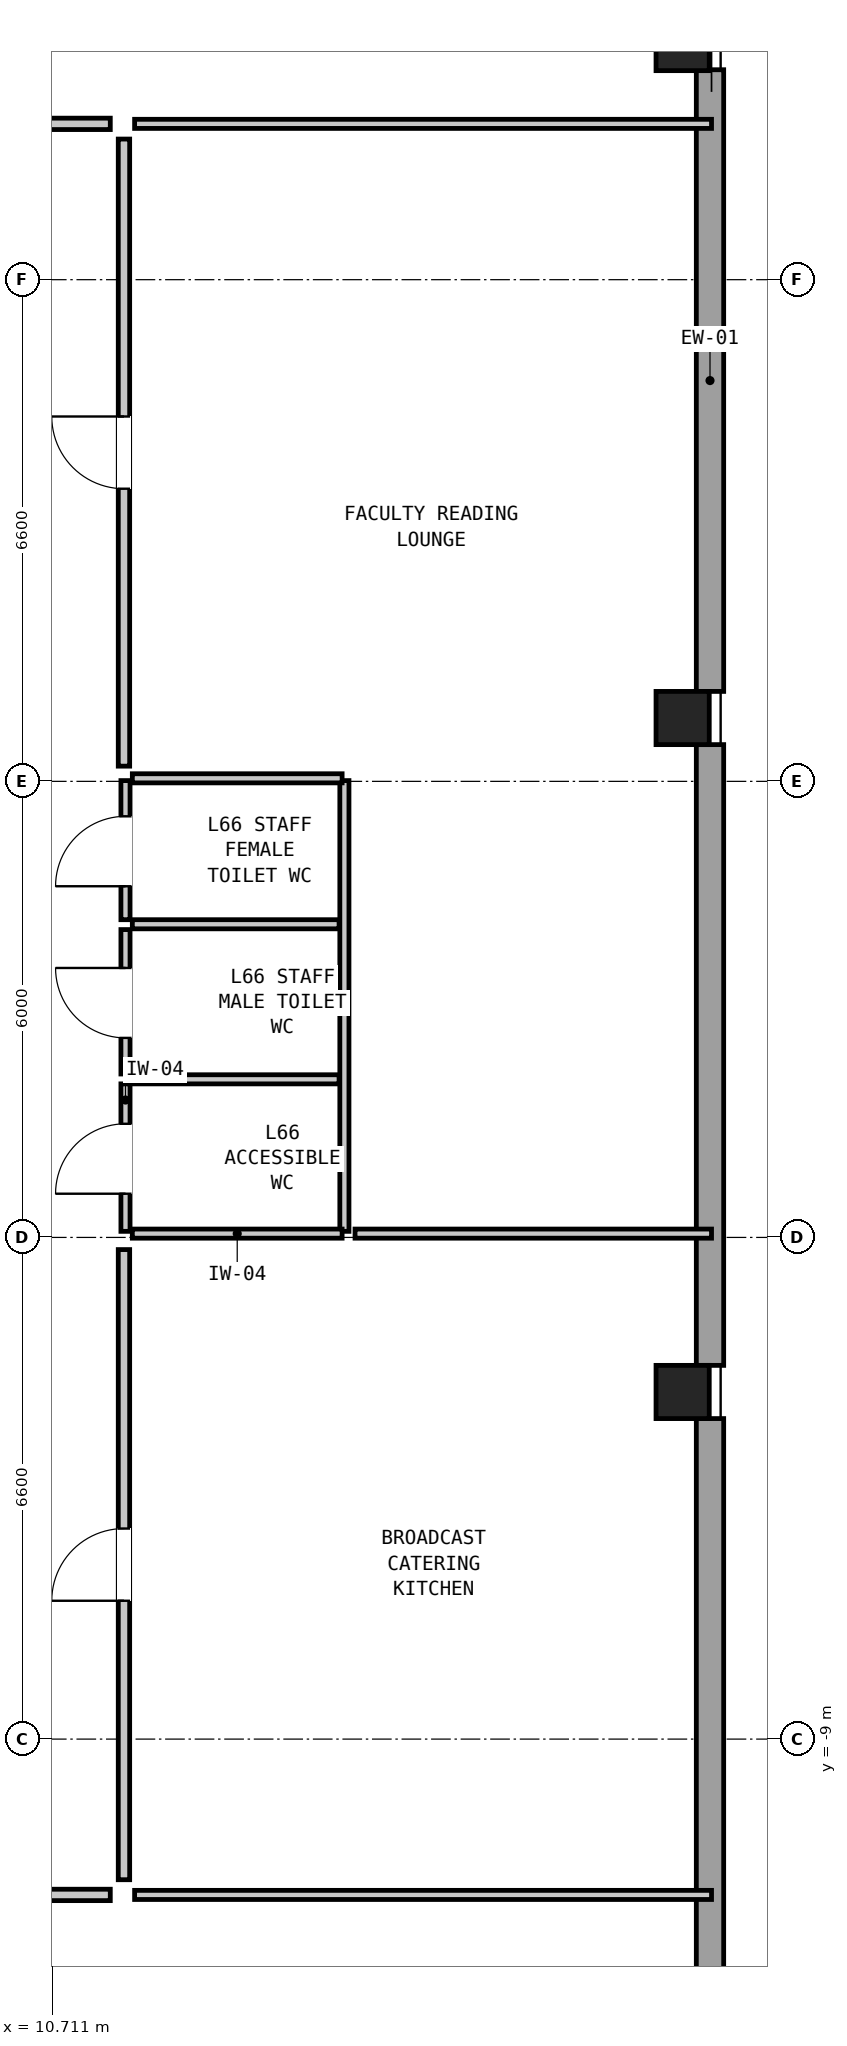
"""IFC4 building model, lengths in metres.
Left out: names, types, materials, properties, quantities, classifications, styles, units other than length and angle.
Written with IfcOpenShell. Run it as: python <this file> out.ifc"""

import sys

from ifc_helpers import new_model, si_unit, direction, frame, frame_2d, origin, origin_2d, place, context, subcontext, project, spatial, rectangle, hollow_rectangle, extrude, element, fill, save


model = new_model("IFC4")
c1 = context("Model", 3, precision=1e-05, world=origin(), true_north=direction((0.0, 1.0)))
c2 = subcontext(c1, "Body", "Model", "MODEL_VIEW")
j1 = project(units=[si_unit("LENGTHUNIT", "METRE"), si_unit("PLANEANGLEUNIT", "RADIAN")], contexts=[c1])
p1 = place(None, origin())
s1 = spatial("IfcSite", under=j1, at=p1, CompositionType="ELEMENT")
p2 = place(p1, origin())
s2 = spatial("IfcBuilding", under=s1, at=p2, CompositionType="ELEMENT")
p3 = place(p2, frame((0.0, 0.0, 223.9)))
s3 = spatial("IfcBuildingStorey", under=s2, at=p3, CompositionType="ELEMENT", Elevation=223.9)
for number, where, z_axis, x_axis in (
    (1, (19.0, -4.433, 0.0), (0.0, 0.0, 1.0), (0.0, 1.0, 0.0)),
    (2, (19.0, 4.433, 0.0), (0.0, 0.0, 1.0), (0.0, 1.0, 0.0)),
    (3, (19.0, 13.3, 0.0), (0.0, 0.0, 1.0), (0.0, 1.0, 0.0)),
):
    element("IfcColumn", number, at=place(p3, frame(where, z_axis=z_axis, x_axis=x_axis)), inside=s3, PredefinedType="COLUMN", context=c2, shape_type="SweptSolid", body=[
        extrude(hollow_rectangle(XDim=0.7, YDim=0.7, WallThickness=0.045, at=origin_2d()), origin(), (0.0, 0.0, 1.0), 3.05),
    ])
p4 = place(p3, frame((19.36, 12.962, 0.0), z_axis=(0.0, 0.0, 1.0), x_axis=(0.0, -1.0, 0.0)))
e4 = element("IfcWall", 4, at=p4, inside=s3, PredefinedType="SOLIDWALL", context=c2, shape_type="SweptSolid", body=[
    extrude(rectangle(XDim=8.179, YDim=0.36, at=frame_2d((4.089, 0.0))), origin(), (0.0, 0.0, 1.0), 0.98),
])
p5 = place(p3, frame((19.36, 4.083, 0.0), z_axis=(0.0, 0.0, 1.0), x_axis=(0.0, -1.0, 0.0)))
e5 = element("IfcWall", 5, at=p5, inside=s3, PredefinedType="SOLIDWALL", context=c2, shape_type="SweptSolid", body=[
    extrude(rectangle(XDim=8.167, YDim=0.36, at=frame_2d((4.083, 0.0))), origin(), (0.0, 0.0, 1.0), 0.98),
])
p6 = place(p3, frame((19.36, -4.783, 0.0), z_axis=(0.0, 0.0, 1.0), x_axis=(0.0, -1.0, 0.0)))
e6 = element("IfcWall", 6, at=p6, inside=s3, PredefinedType="SOLIDWALL", context=c2, shape_type="SweptSolid", body=[
    extrude(rectangle(XDim=8.179, YDim=0.36, at=frame_2d((4.089, 0.0))), origin(), (0.0, 0.0, 1.0), 0.98),
])
p7 = place(p3, frame((11.67, -2.32, 0.0), z_axis=(0.0, 0.0, 1.0), x_axis=(0.0, 1.0, 0.0)))
e7 = element("IfcWall", 7, at=p7, inside=s3, PredefinedType="PARTITIONING", context=c2, shape_type="SweptSolid", body=[
    extrude(rectangle(XDim=1.94, YDim=0.12, at=frame_2d((0.97, 0.0))), origin(), (0.0, 0.0, 1.0), 2.86),
])
p8 = place(p7, frame((0.495, 0.0, 0.0)))
e8 = element("IfcOpeningElement", 8, at=p8, cuts=e7, PredefinedType="OPENING", context=c2, shape_type="SweptSolid", body=[
    extrude(rectangle(XDim=0.92, YDim=2.1, at=frame_2d((0.46, 1.05))), frame((0.0, 0.072, 0.0), z_axis=(0.0, -1.0, 0.0), x_axis=(1.0, 0.0, 0.0)), (0.0, 0.0, 1.0), 0.144),
])
p9 = place(p3, frame((11.67, -0.25, 0.0), z_axis=(0.0, 0.0, 1.0), x_axis=(0.0, 1.0, 0.0)))
e9 = element("IfcWall", 9, at=p9, inside=s3, PredefinedType="PARTITIONING", context=c2, shape_type="SweptSolid", body=[
    extrude(rectangle(XDim=1.9, YDim=0.12, at=frame_2d((0.95, 0.0))), origin(), (0.0, 0.0, 1.0), 2.86),
])
p10 = place(p9, frame((0.475, 0.0, 0.0)))
e10 = element("IfcOpeningElement", 10, at=p10, cuts=e9, PredefinedType="OPENING", context=c2, shape_type="SweptSolid", body=[
    extrude(rectangle(XDim=0.92, YDim=2.1, at=frame_2d((0.46, 1.05))), frame((0.0, 0.072, 0.0), z_axis=(0.0, -1.0, 0.0), x_axis=(1.0, 0.0, 0.0)), (0.0, 0.0, 1.0), 0.144),
])
p11 = place(p3, frame((11.67, 1.78, 0.0), z_axis=(0.0, 0.0, 1.0), x_axis=(0.0, 1.0, 0.0)))
e11 = element("IfcWall", 11, at=p11, inside=s3, PredefinedType="PARTITIONING", context=c2, shape_type="SweptSolid", body=[
    extrude(rectangle(XDim=1.83, YDim=0.12, at=frame_2d((0.915, 0.0))), origin(), (0.0, 0.0, 1.0), 2.86),
])
p12 = place(p11, frame((0.44, 0.0, 0.0)))
e12 = element("IfcOpeningElement", 12, at=p12, cuts=e11, PredefinedType="OPENING", context=c2, shape_type="SweptSolid", body=[
    extrude(rectangle(XDim=0.92, YDim=2.1, at=frame_2d((0.46, 1.05))), frame((0.0, 0.072, 0.0), z_axis=(0.0, -1.0, 0.0), x_axis=(1.0, 0.0, 0.0)), (0.0, 0.0, 1.0), 0.144),
])
p13 = place(p3, frame((14.55, -2.32, 0.0), z_axis=(0.0, 0.0, 1.0), x_axis=(0.0, 1.0, 0.0)))
e13 = element("IfcWall", 13, at=p13, inside=s3, PredefinedType="PARTITIONING", context=c2, shape_type="SweptSolid", body=[
    extrude(rectangle(XDim=5.93, YDim=0.12, at=frame_2d((2.965, 0.0))), origin(), (0.0, 0.0, 1.0), 2.86),
])
for number, where, z_axis, x_axis in (
    (14, (11.76, -2.35, 0.0), (0.0, 0.0, 1.0), (1.0, 0.0, 0.0)),
    (15, (11.76, 3.64, 0.0), (0.0, 0.0, 1.0), (1.0, 0.0, 0.0)),
):
    element("IfcWall", number, at=place(p3, frame(where, z_axis=z_axis, x_axis=x_axis)), inside=s3, PredefinedType="PARTITIONING", context=c2, shape_type="SweptSolid", body=[
        extrude(rectangle(XDim=2.76, YDim=0.12, at=frame_2d((1.38, 0.0))), origin(), (0.0, 0.0, 1.0), 1.04),
    ])
for number, where, z_axis, x_axis in (
    (16, (11.76, -0.32, 0.0), (0.0, 0.0, 1.0), (1.0, 0.0, 0.0)),
    (17, (11.76, 1.72, 0.0), (0.0, 0.0, 1.0), (1.0, 0.0, 0.0)),
):
    element("IfcWall", number, at=place(p3, frame(where, z_axis=z_axis, x_axis=x_axis)), inside=s3, PredefinedType="PARTITIONING", context=c2, shape_type="SweptSolid", body=[
        extrude(rectangle(XDim=2.72, YDim=0.12, at=frame_2d((1.36, 0.0))), origin(), (0.0, 0.0, 1.0), 2.86),
    ])
for number, where, z_axis, x_axis in (
    (18, (11.79, 12.25, 0.0), (0.0, 0.0, 1.0), (1.0, 0.0, 0.0)),
    (19, (11.79, -11.05, 0.0), (0.0, 0.0, 1.0), (1.0, 0.0, 0.0)),
):
    element("IfcWall", number, at=place(p3, frame(where, z_axis=z_axis, x_axis=x_axis)), inside=s3, PredefinedType="PARTITIONING", context=c2, shape_type="SweptSolid", body=[
        extrude(rectangle(XDim=7.59, YDim=0.12, at=frame_2d((3.795, 0.0))), origin(), (0.0, 0.0, 1.0), 2.86),
    ])
p14 = place(p3, frame((14.69, -2.35, 0.0), z_axis=(0.0, 0.0, 1.0), x_axis=(1.0, 0.0, 0.0)))
e20 = element("IfcWall", 20, at=p14, inside=s3, PredefinedType="PARTITIONING", context=c2, shape_type="SweptSolid", body=[
    extrude(rectangle(XDim=4.69, YDim=0.12, at=frame_2d((2.345, 0.0))), origin(), (0.0, 0.0, 1.0), 1.04),
])
p15 = place(p3, frame((5.58, 12.25, 0.0), z_axis=(0.0, 0.0, 1.0), x_axis=(1.0, 0.0, 0.0)))
e21 = element("IfcWall", 21, at=p15, inside=s3, PredefinedType="PARTITIONING", context=c2, shape_type="SweptSolid", body=[
    extrude(rectangle(XDim=5.89, YDim=0.15, at=frame_2d((2.945, 0.0))), origin(), (0.0, 0.0, 1.0), 2.86),
])
p16 = place(p15, frame((2.145, 0.0, 0.0)))
e22 = element("IfcOpeningElement", 22, at=p16, cuts=e21, PredefinedType="OPENING", context=c2, shape_type="SweptSolid", body=[
    extrude(rectangle(XDim=1.2, YDim=2.1, at=frame_2d((0.6, 1.05))), frame((0.0, 0.087, 0.0), z_axis=(0.0, -1.0, 0.0), x_axis=(1.0, 0.0, 0.0)), (0.0, 0.0, 1.0), 0.174),
])
p17 = place(p3, frame((0.18, -11.05, 0.0), z_axis=(0.0, 0.0, 1.0), x_axis=(1.0, 0.0, 0.0)))
e23 = element("IfcWall", 23, at=p17, inside=s3, PredefinedType="PARTITIONING", context=c2, shape_type="SweptSolid", body=[
    extrude(rectangle(XDim=11.29, YDim=0.15, at=frame_2d((5.645, 0.0))), origin(), (0.0, 0.0, 1.0), 2.86),
])
p18 = place(p17, frame((5.045, 0.0, 0.0)))
e24 = element("IfcOpeningElement", 24, at=p18, cuts=e23, PredefinedType="OPENING", context=c2, shape_type="SweptSolid", body=[
    extrude(rectangle(XDim=1.2, YDim=2.1, at=frame_2d((0.6, 1.05))), frame((0.0, 0.087, 0.0), z_axis=(0.0, -1.0, 0.0), x_axis=(1.0, 0.0, 0.0)), (0.0, 0.0, 1.0), 0.174),
])
p19 = place(p3, frame((11.65, -10.85, 0.0), z_axis=(0.0, 0.0, 1.0), x_axis=(0.0, 1.0, 0.0)))
e25 = element("IfcWall", 25, at=p19, inside=s3, PredefinedType="PARTITIONING", context=c2, shape_type="SweptSolid", body=[
    extrude(rectangle(XDim=8.29, YDim=0.15, at=frame_2d((4.145, 0.0))), origin(), (0.0, 0.0, 1.0), 2.86),
])
p20 = place(p19, frame((3.67, 0.0, 0.0)))
e26 = element("IfcOpeningElement", 26, at=p20, cuts=e25, PredefinedType="OPENING", context=c2, shape_type="SweptSolid", body=[
    extrude(rectangle(XDim=0.95, YDim=2.1, at=frame_2d((0.475, 1.05))), frame((0.0, 0.087, 0.0), z_axis=(0.0, -1.0, 0.0), x_axis=(1.0, 0.0, 0.0)), (0.0, 0.0, 1.0), 0.174),
])
p21 = place(p3, frame((11.65, 3.8, 0.0), z_axis=(0.0, 0.0, 1.0), x_axis=(0.0, 1.0, 0.0)))
e27 = element("IfcWall", 27, at=p21, inside=s3, PredefinedType="PARTITIONING", context=c2, shape_type="SweptSolid", body=[
    extrude(rectangle(XDim=8.25, YDim=0.15, at=frame_2d((4.125, 0.0))), origin(), (0.0, 0.0, 1.0), 2.86),
])
p22 = place(p21, frame((3.65, 0.0, 0.0)))
e28 = element("IfcOpeningElement", 28, at=p22, cuts=e27, PredefinedType="OPENING", context=c2, shape_type="SweptSolid", body=[
    extrude(rectangle(XDim=0.95, YDim=2.1, at=frame_2d((0.475, 1.05))), frame((0.0, 0.087, 0.0), z_axis=(0.0, -1.0, 0.0), x_axis=(1.0, 0.0, 0.0)), (0.0, 0.0, 1.0), 0.174),
])
p23 = place(p8, origin())
e29 = element("IfcDoor", 29, at=p23, inside=s3, OperationType="SINGLE_SWING_LEFT", PredefinedType="DOOR", context=c2, shape_type="SweptSolid", body=[
    extrude(rectangle(XDim=0.92, YDim=2.1, at=frame_2d((0.46, 1.05))), frame((0.0, 0.025, 0.0), z_axis=(0.0, -1.0, 0.0), x_axis=(1.0, 0.0, 0.0)), (0.0, 0.0, 1.0), 0.05),
])
fill(e8, e29)
p24 = place(p10, origin())
e30 = element("IfcDoor", 30, at=p24, inside=s3, OperationType="SINGLE_SWING_RIGHT", PredefinedType="DOOR", context=c2, shape_type="SweptSolid", body=[
    extrude(rectangle(XDim=0.92, YDim=2.1, at=frame_2d((0.46, 1.05))), frame((0.0, 0.025, 0.0), z_axis=(0.0, -1.0, 0.0), x_axis=(1.0, 0.0, 0.0)), (0.0, 0.0, 1.0), 0.05),
])
fill(e10, e30)
p25 = place(p12, origin())
e31 = element("IfcDoor", 31, at=p25, inside=s3, OperationType="SINGLE_SWING_LEFT", PredefinedType="DOOR", context=c2, shape_type="SweptSolid", body=[
    extrude(rectangle(XDim=0.92, YDim=2.1, at=frame_2d((0.46, 1.05))), frame((0.0, 0.025, 0.0), z_axis=(0.0, -1.0, 0.0), x_axis=(1.0, 0.0, 0.0)), (0.0, 0.0, 1.0), 0.05),
])
fill(e12, e31)
p26 = place(p20, origin())
e32 = element("IfcDoor", 32, at=p26, inside=s3, OperationType="SINGLE_SWING_LEFT", PredefinedType="DOOR", context=c2, shape_type="SweptSolid", body=[
    extrude(rectangle(XDim=0.95, YDim=2.1, at=frame_2d((0.475, 1.05))), frame((0.0, 0.025, 0.0), z_axis=(0.0, -1.0, 0.0), x_axis=(1.0, 0.0, 0.0)), (0.0, 0.0, 1.0), 0.05),
])
fill(e26, e32)
p27 = place(p22, origin())
e33 = element("IfcDoor", 33, at=p27, inside=s3, OperationType="SINGLE_SWING_RIGHT", PredefinedType="DOOR", context=c2, shape_type="SweptSolid", body=[
    extrude(rectangle(XDim=0.95, YDim=2.1, at=frame_2d((0.475, 1.05))), frame((0.0, 0.025, 0.0), z_axis=(0.0, -1.0, 0.0), x_axis=(1.0, 0.0, 0.0)), (0.0, 0.0, 1.0), 0.05),
])
fill(e28, e33)
save(model, sys.argv[1])
